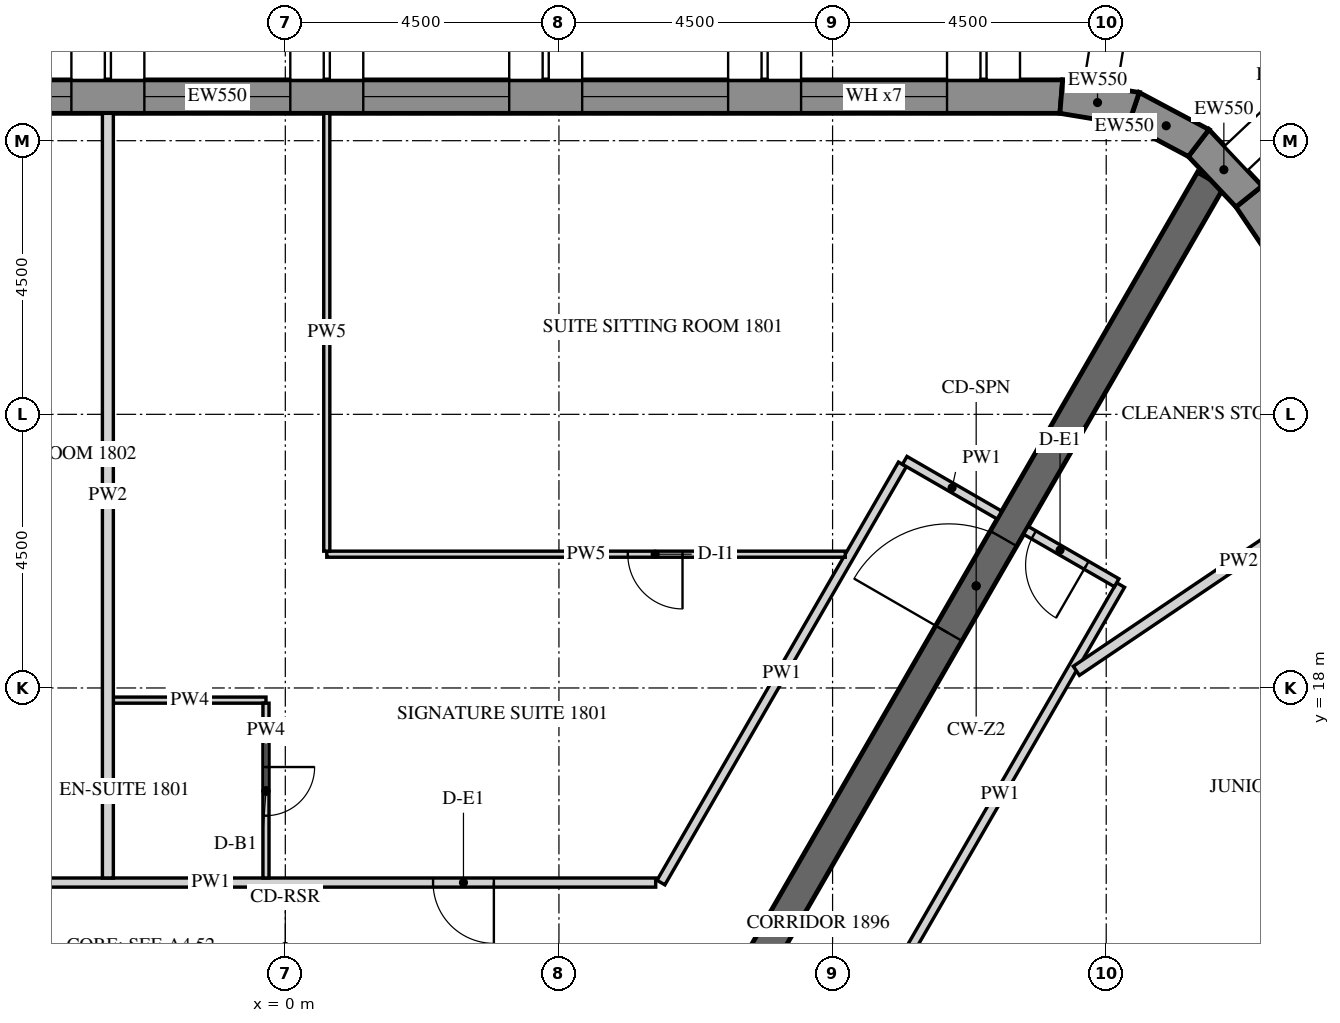
"""IFC4 building model, lengths in metres.
Left out: names, types, materials, properties, quantities, classifications, styles, units other than length and angle.
Written with IfcOpenShell. Run it as: python <this file> out.ifc"""

import sys

from ifc_helpers import new_model, si_unit, direction, frame, frame_2d, origin, place, context, subcontext, project, spatial, polyline, rectangle, outline, extrude, element, fill, save


model = new_model("IFC4")
c1 = context("Model", 3, precision=1e-05, world=origin(), true_north=direction((0.0, 1.0)))
c2 = subcontext(c1, "Body", "Model", "MODEL_VIEW")
j1 = project(units=[si_unit("LENGTHUNIT", "METRE"), si_unit("PLANEANGLEUNIT", "RADIAN")], contexts=[c1])
p1 = place(None, origin())
s1 = spatial("IfcSite", under=j1, at=p1, CompositionType="ELEMENT")
p2 = place(p1, origin())
s2 = spatial("IfcBuilding", under=s1, at=p2, CompositionType="ELEMENT")
p3 = place(p2, frame((0.0, 0.0, 226.8)))
s3 = spatial("IfcBuildingStorey", under=s2, at=p3, CompositionType="ELEMENT", Elevation=226.8)
p4 = place(p3, frame((12.761, 27.725, -0.15), z_axis=(0.0, 0.0, 1.0), x_axis=(-1.0, 0.0, 0.0)))
e1 = element("IfcWall", 1, at=p4, inside=s3, PredefinedType="SOLIDWALL", context=c2, shape_type="SweptSolid", body=[
    extrude(outline(polyline([(-0.022, -0.275), (27.783, -0.275), (27.732, 0.275), (0.022, 0.275), (-0.022, -0.275)])), origin(), (0.0, 0.0, 1.0), 3.9),
])
p5 = place(p4, frame((1.879, 0.0, 1.05)))
e2 = element("IfcOpeningElement", 2, at=p5, cuts=e1, PredefinedType="OPENING", context=c2, shape_type="SweptSolid", body=[
    extrude(rectangle(XDim=2.4, YDim=2.4, at=frame_2d((1.2, 1.2))), frame((0.0, 0.285, 0.0), z_axis=(0.0, -1.0, 0.0), x_axis=(1.0, 0.0, 0.0)), (0.0, 0.0, 1.0), 0.57),
])
p6 = place(p4, frame((5.479, 0.0, 1.05)))
e3 = element("IfcOpeningElement", 3, at=p6, cuts=e1, PredefinedType="OPENING", context=c2, shape_type="SweptSolid", body=[
    extrude(rectangle(XDim=2.4, YDim=2.4, at=frame_2d((1.2, 1.2))), frame((0.0, 0.285, 0.0), z_axis=(0.0, -1.0, 0.0), x_axis=(1.0, 0.0, 0.0)), (0.0, 0.0, 1.0), 0.57),
])
p7 = place(p4, frame((9.079, 0.0, 1.05)))
e4 = element("IfcOpeningElement", 4, at=p7, cuts=e1, PredefinedType="OPENING", context=c2, shape_type="SweptSolid", body=[
    extrude(rectangle(XDim=2.4, YDim=2.4, at=frame_2d((1.2, 1.2))), frame((0.0, 0.285, 0.0), z_axis=(0.0, -1.0, 0.0), x_axis=(1.0, 0.0, 0.0)), (0.0, 0.0, 1.0), 0.57),
])
p8 = place(p4, frame((12.679, 0.0, 1.05)))
e5 = element("IfcOpeningElement", 5, at=p8, cuts=e1, PredefinedType="OPENING", context=c2, shape_type="SweptSolid", body=[
    extrude(rectangle(XDim=2.4, YDim=2.4, at=frame_2d((1.2, 1.2))), frame((0.0, 0.285, 0.0), z_axis=(0.0, -1.0, 0.0), x_axis=(1.0, 0.0, 0.0)), (0.0, 0.0, 1.0), 0.57),
])
p9 = place(p4, frame((16.279, 0.0, 1.05)))
e6 = element("IfcOpeningElement", 6, at=p9, cuts=e1, PredefinedType="OPENING", context=c2, shape_type="SweptSolid", body=[
    extrude(rectangle(XDim=2.4, YDim=2.4, at=frame_2d((1.2, 1.2))), frame((0.0, 0.285, 0.0), z_axis=(0.0, -1.0, 0.0), x_axis=(1.0, 0.0, 0.0)), (0.0, 0.0, 1.0), 0.57),
])
p10 = place(p4, frame((19.879, 0.0, 1.05)))
e7 = element("IfcOpeningElement", 7, at=p10, cuts=e1, PredefinedType="OPENING", context=c2, shape_type="SweptSolid", body=[
    extrude(rectangle(XDim=2.4, YDim=2.4, at=frame_2d((1.2, 1.2))), frame((0.0, 0.285, 0.0), z_axis=(0.0, -1.0, 0.0), x_axis=(1.0, 0.0, 0.0)), (0.0, 0.0, 1.0), 0.57),
])
p11 = place(p4, frame((23.479, 0.0, 1.05)))
e8 = element("IfcOpeningElement", 8, at=p11, cuts=e1, PredefinedType="OPENING", context=c2, shape_type="SweptSolid", body=[
    extrude(rectangle(XDim=2.4, YDim=2.4, at=frame_2d((1.2, 1.2))), frame((0.0, 0.285, 0.0), z_axis=(0.0, -1.0, 0.0), x_axis=(1.0, 0.0, 0.0)), (0.0, 0.0, 1.0), 0.57),
])
p12 = place(p3, frame((31.371, 3.071, -0.15), z_axis=(0.0, 0.0, 1.0), x_axis=(-0.559189891278, 0.829039604297, 0.0)))
e9 = element("IfcWall", 9, at=p12, inside=s3, PredefinedType="SOLIDWALL", context=c2, shape_type="SweptSolid", body=[
    extrude(outline(polyline([(-0.026, -0.275), (27.781, -0.275), (27.736, 0.275), (0.026, 0.275), (-0.026, -0.275)])), origin(), (0.0, 0.0, 1.0), 3.9),
])
p13 = place(p12, frame((1.879, 0.0, 1.05)))
e10 = element("IfcOpeningElement", 10, at=p13, cuts=e9, PredefinedType="OPENING", context=c2, shape_type="SweptSolid", body=[
    extrude(rectangle(XDim=2.4, YDim=2.4, at=frame_2d((1.2, 1.2))), frame((0.0, 0.285, 0.0), z_axis=(0.0, -1.0, 0.0), x_axis=(1.0, 0.0, 0.0)), (0.0, 0.0, 1.0), 0.57),
])
p14 = place(p12, frame((5.479, 0.0, 1.05)))
e11 = element("IfcOpeningElement", 11, at=p14, cuts=e9, PredefinedType="OPENING", context=c2, shape_type="SweptSolid", body=[
    extrude(rectangle(XDim=2.4, YDim=2.4, at=frame_2d((1.2, 1.2))), frame((0.0, 0.285, 0.0), z_axis=(0.0, -1.0, 0.0), x_axis=(1.0, 0.0, 0.0)), (0.0, 0.0, 1.0), 0.57),
])
p15 = place(p12, frame((9.079, 0.0, 1.05)))
e12 = element("IfcOpeningElement", 12, at=p15, cuts=e9, PredefinedType="OPENING", context=c2, shape_type="SweptSolid", body=[
    extrude(rectangle(XDim=2.4, YDim=2.4, at=frame_2d((1.2, 1.2))), frame((0.0, 0.285, 0.0), z_axis=(0.0, -1.0, 0.0), x_axis=(1.0, 0.0, 0.0)), (0.0, 0.0, 1.0), 0.57),
])
p16 = place(p12, frame((12.679, 0.0, 1.05)))
e13 = element("IfcOpeningElement", 13, at=p16, cuts=e9, PredefinedType="OPENING", context=c2, shape_type="SweptSolid", body=[
    extrude(rectangle(XDim=2.4, YDim=2.4, at=frame_2d((1.2, 1.2))), frame((0.0, 0.285, 0.0), z_axis=(0.0, -1.0, 0.0), x_axis=(1.0, 0.0, 0.0)), (0.0, 0.0, 1.0), 0.57),
])
p17 = place(p12, frame((16.279, 0.0, 1.05)))
e14 = element("IfcOpeningElement", 14, at=p17, cuts=e9, PredefinedType="OPENING", context=c2, shape_type="SweptSolid", body=[
    extrude(rectangle(XDim=2.4, YDim=2.4, at=frame_2d((1.2, 1.2))), frame((0.0, 0.285, 0.0), z_axis=(0.0, -1.0, 0.0), x_axis=(1.0, 0.0, 0.0)), (0.0, 0.0, 1.0), 0.57),
])
p18 = place(p12, frame((19.879, 0.0, 1.05)))
e15 = element("IfcOpeningElement", 15, at=p18, cuts=e9, PredefinedType="OPENING", context=c2, shape_type="SweptSolid", body=[
    extrude(rectangle(XDim=2.4, YDim=2.4, at=frame_2d((1.2, 1.2))), frame((0.0, 0.285, 0.0), z_axis=(0.0, -1.0, 0.0), x_axis=(1.0, 0.0, 0.0)), (0.0, 0.0, 1.0), 0.57),
])
p19 = place(p12, frame((23.479, 0.0, 1.05)))
e16 = element("IfcOpeningElement", 16, at=p19, cuts=e9, PredefinedType="OPENING", context=c2, shape_type="SweptSolid", body=[
    extrude(rectangle(XDim=2.4, YDim=2.4, at=frame_2d((1.2, 1.2))), frame((0.0, 0.285, 0.0), z_axis=(0.0, -1.0, 0.0), x_axis=(1.0, 0.0, 0.0)), (0.0, 0.0, 1.0), 0.57),
])
p20 = place(p3, frame((15.849, 26.083, -0.15), z_axis=(0.0, 0.0, 1.0), x_axis=(-0.686196220404, 0.727416488061, 0.0)))
e17 = element("IfcWall", 17, at=p20, inside=s3, PredefinedType="SOLIDWALL", context=c2, shape_type="SweptSolid", body=[
    extrude(outline(polyline([(-0.022, -0.275), (1.253, -0.275), (1.163, 0.275), (0.022, 0.275), (-0.022, -0.275)])), origin(), (0.0, 0.0, 1.0), 3.9),
])
p21 = place(p3, frame((15.02, 26.962, -0.15), z_axis=(0.0, 0.0, 1.0), x_axis=(-0.882950818639, 0.469465495926, 0.0)))
e18 = element("IfcWall", 18, at=p21, inside=s3, PredefinedType="SOLIDWALL", context=c2, shape_type="SweptSolid", body=[
    extrude(outline(polyline([(-0.045, -0.275), (1.253, -0.275), (1.163, 0.275), (0.045, 0.275), (-0.045, -0.275)])), origin(), (0.0, 0.0, 1.0), 3.9),
])
p22 = place(p3, frame((13.953, 27.529, -0.15), z_axis=(0.0, 0.0, 1.0), x_axis=(-0.986751945211, 0.162236243244, 0.0)))
e19 = element("IfcWall", 19, at=p22, inside=s3, PredefinedType="SOLIDWALL", context=c2, shape_type="SweptSolid", body=[
    extrude(outline(polyline([(-0.045, -0.275), (1.231, -0.275), (1.186, 0.275), (0.045, 0.275), (-0.045, -0.275)])), origin(), (0.0, 0.0, 1.0), 3.9),
])
p23 = place(p3, frame((7.506, 13.0, -0.15), z_axis=(0.0, 0.0, 1.0), x_axis=(0.499988271576, 0.866032175087, 0.0)))
e20 = element("IfcWall", 20, at=p23, inside=s3, PredefinedType="SHEAR", context=c2, shape_type="SweptSolid", body=[
    extrude(rectangle(XDim=15.424, YDim=0.5, at=frame_2d((7.712, 0.0))), origin(), (0.0, 0.0, 1.0), 3.9),
])
p24 = place(p23, frame((6.812, 0.0, 0.15)))
e21 = element("IfcOpeningElement", 21, at=p24, cuts=e20, PredefinedType="OPENING", context=c2, shape_type="SweptSolid", body=[
    extrude(rectangle(XDim=1.8, YDim=2.4, at=frame_2d((0.9, 1.2))), frame((0.0, 0.26, 0.0), z_axis=(0.0, -1.0, 0.0), x_axis=(1.0, 0.0, 0.0)), (0.0, 0.0, 1.0), 0.52),
])
p25 = place(p3, frame((10.149, 21.678, 0.0), z_axis=(0.0, 0.0, 1.0), x_axis=(-0.499997422768, -0.866026891745, 0.0)))
e22 = element("IfcWall", 22, at=p25, inside=s3, PredefinedType="PARTITIONING", context=c2, shape_type="SweptSolid", body=[
    extrude(rectangle(XDim=7.942, YDim=0.15, at=frame_2d((3.971, 0.0))), origin(), (0.0, 0.0, 1.0), 2.988),
])
p26 = place(p3, frame((6.091, 14.8, 0.0), z_axis=(0.0, 0.0, 1.0), x_axis=(-1.0, 0.0, 0.0)))
e23 = element("IfcWall", 23, at=p26, inside=s3, PredefinedType="PARTITIONING", context=c2, shape_type="SweptSolid", body=[
    extrude(rectangle(XDim=14.636, YDim=0.15, at=frame_2d((7.318, 0.0))), origin(), (0.0, 0.0, 1.0), 2.988),
])
p27 = place(p26, frame((2.661, 0.0, 0.0)))
e24 = element("IfcOpeningElement", 24, at=p27, cuts=e23, PredefinedType="OPENING", context=c2, shape_type="SweptSolid", body=[
    extrude(rectangle(XDim=1.0, YDim=2.1, at=frame_2d((0.5, 1.05))), frame((0.0, 0.085, 0.0), z_axis=(0.0, -1.0, 0.0), x_axis=(1.0, 0.0, 0.0)), (0.0, 0.0, 1.0), 0.17),
])
p28 = place(p26, frame((10.309, 0.0, 0.0)))
e25 = element("IfcOpeningElement", 25, at=p28, cuts=e23, PredefinedType="OPENING", context=c2, shape_type="SweptSolid", body=[
    extrude(rectangle(XDim=1.0, YDim=2.1, at=frame_2d((0.5, 1.05))), frame((0.0, 0.085, 0.0), z_axis=(0.0, -1.0, 0.0), x_axis=(1.0, 0.0, 0.0)), (0.0, 0.0, 1.0), 0.17),
])
p29 = place(p26, frame((13.486, 0.0, 0.0)))
e26 = element("IfcOpeningElement", 26, at=p29, cuts=e23, PredefinedType="OPENING", context=c2, shape_type="SweptSolid", body=[
    extrude(rectangle(XDim=1.0, YDim=2.1, at=frame_2d((0.5, 1.05))), frame((0.0, 0.085, 0.0), z_axis=(0.0, -1.0, 0.0), x_axis=(1.0, 0.0, 0.0)), (0.0, 0.0, 1.0), 0.17),
])
p30 = place(p3, frame((11.745, 20.843, 0.0), z_axis=(0.0, 0.0, 1.0), x_axis=(-0.865989075817, 0.500062916607, 0.0)))
e27 = element("IfcWall", 27, at=p30, inside=s3, PredefinedType="PARTITIONING", context=c2, shape_type="SweptSolid", body=[
    extrude(rectangle(XDim=1.8, YDim=0.15, at=frame_2d((0.9, 0.0))), origin(), (0.0, 0.0, 1.0), 2.988),
])
p31 = place(p3, frame((9.772, 12.825, 0.0), z_axis=(0.0, 0.0, 1.0), x_axis=(0.499989830942, 0.866031274813, 0.0)))
e28 = element("IfcWall", 28, at=p31, inside=s3, PredefinedType="PARTITIONING", context=c2, shape_type="SweptSolid", body=[
    extrude(rectangle(XDim=7.93, YDim=0.15, at=frame_2d((3.965, 0.0))), origin(), (0.0, 0.0, 1.0), 2.988),
])
p32 = place(p3, frame((13.672, 19.73, 0.0), z_axis=(0.0, 0.0, 1.0), x_axis=(-0.866074815912, 0.499914405916, 0.0)))
e29 = element("IfcWall", 29, at=p32, inside=s3, PredefinedType="PARTITIONING", context=c2, shape_type="SweptSolid", body=[
    extrude(rectangle(XDim=1.725, YDim=0.15, at=frame_2d((0.862, 0.0))), origin(), (0.0, 0.0, 1.0), 2.988),
])
p33 = place(p32, frame((0.575, 0.0, 0.0)))
e30 = element("IfcOpeningElement", 30, at=p33, cuts=e29, PredefinedType="OPENING", context=c2, shape_type="SweptSolid", body=[
    extrude(rectangle(XDim=1.0, YDim=2.1, at=frame_2d((0.5, 1.05))), frame((0.0, 0.085, 0.0), z_axis=(0.0, -1.0, 0.0), x_axis=(1.0, 0.0, 0.0)), (0.0, 0.0, 1.0), 0.17),
])
p34 = place(p3, frame((-2.828, 17.8, 0.0), z_axis=(0.0, 0.0, 1.0), x_axis=(1.0, 0.0, 0.0)))
e31 = element("IfcWall", 31, at=p34, inside=s3, PredefinedType="PARTITIONING", context=c2, shape_type="SweptSolid", body=[
    extrude(rectangle(XDim=2.51, YDim=0.1, at=frame_2d((1.255, 0.0))), origin(), (0.0, 0.0, 1.0), 2.988),
])
p35 = place(p3, frame((-0.318, 17.75, 0.0), z_axis=(0.0, 0.0, 1.0), x_axis=(0.0, -1.0, 0.0)))
e32 = element("IfcWall", 32, at=p35, inside=s3, PredefinedType="PARTITIONING", context=c2, shape_type="SweptSolid", body=[
    extrude(rectangle(XDim=2.875, YDim=0.1, at=frame_2d((1.438, 0.0))), origin(), (0.0, 0.0, 1.0), 2.988),
])
p36 = place(p35, frame((1.05, 0.0, 0.0)))
e33 = element("IfcOpeningElement", 33, at=p36, cuts=e32, PredefinedType="OPENING", context=c2, shape_type="SweptSolid", body=[
    extrude(rectangle(XDim=0.8, YDim=2.1, at=frame_2d((0.4, 1.05))), frame((0.0, 0.06, 0.0), z_axis=(0.0, -1.0, 0.0), x_axis=(1.0, 0.0, 0.0)), (0.0, 0.0, 1.0), 0.12),
])
p37 = place(p3, frame((9.209, 20.2, 0.0), z_axis=(0.0, 0.0, 1.0), x_axis=(-1.0, 0.0, 0.0)))
e34 = element("IfcWall", 34, at=p37, inside=s3, PredefinedType="PARTITIONING", context=c2, shape_type="SweptSolid", body=[
    extrude(rectangle(XDim=8.527, YDim=0.1, at=frame_2d((4.263, 0.0))), origin(), (0.0, 0.0, 1.0), 2.988),
])
p38 = place(p37, frame((2.677, 0.0, 0.0)))
e35 = element("IfcOpeningElement", 35, at=p38, cuts=e34, PredefinedType="OPENING", context=c2, shape_type="SweptSolid", body=[
    extrude(rectangle(XDim=0.9, YDim=2.1, at=frame_2d((0.45, 1.05))), frame((0.0, 0.06, 0.0), z_axis=(0.0, -1.0, 0.0), x_axis=(1.0, 0.0, 0.0)), (0.0, 0.0, 1.0), 0.12),
])
p39 = place(p3, frame((0.682, 20.25, 0.0), z_axis=(0.0, 0.0, 1.0), x_axis=(0.0, 1.0, 0.0)))
e36 = element("IfcWall", 36, at=p39, inside=s3, PredefinedType="PARTITIONING", context=c2, shape_type="SweptSolid", body=[
    extrude(rectangle(XDim=7.2, YDim=0.1, at=frame_2d((3.6, 0.0))), origin(), (0.0, 0.0, 1.0), 2.988),
])
p40 = place(p3, frame((-2.918, 27.45, 0.0), z_axis=(0.0, 0.0, 1.0), x_axis=(0.0, -1.0, 0.0)))
e37 = element("IfcWall", 37, at=p40, inside=s3, PredefinedType="PARTITIONING", context=c2, shape_type="SweptSolid", body=[
    extrude(rectangle(XDim=12.575, YDim=0.18, at=frame_2d((6.288, 0.0))), origin(), (0.0, 0.0, 1.0), 2.988),
])
p41 = place(p3, frame((22.376, 15.915, 0.0), z_axis=(0.0, 0.0, 1.0), x_axis=(-0.829037148953, -0.559193531487, 0.0)))
e38 = element("IfcWall", 38, at=p41, inside=s3, PredefinedType="PARTITIONING", context=c2, shape_type="SweptSolid", body=[
    extrude(rectangle(XDim=12.491, YDim=0.18, at=frame_2d((6.246, 0.0))), origin(), (0.0, 0.0, 1.0), 2.988),
])
p42 = place(p3, frame((18.35, 21.884, 0.0), z_axis=(0.0, 0.0, 1.0), x_axis=(-0.829047205772, -0.559178621374, 0.0)))
e39 = element("IfcWall", 39, at=p42, inside=s3, PredefinedType="PARTITIONING", context=c2, shape_type="SweptSolid", body=[
    extrude(rectangle(XDim=6.442, YDim=0.18, at=frame_2d((3.221, 0.0))), origin(), (0.0, 0.0, 1.0), 2.988),
])
p43 = place(p5, frame((0.0, 0.205, 0.0)))
e40 = element("IfcWindow", 40, at=p43, inside=s3, PartitioningType="DOUBLE_PANEL_VERTICAL", PredefinedType="WINDOW", context=c2, shape_type="SweptSolid", body=[
    extrude(rectangle(XDim=2.4, YDim=2.4, at=frame_2d((1.2, 1.2))), frame((0.0, 0.03, 0.0), z_axis=(0.0, -1.0, 0.0), x_axis=(1.0, 0.0, 0.0)), (0.0, 0.0, 1.0), 0.06),
])
fill(e2, e40)
p44 = place(p6, frame((0.0, 0.205, 0.0)))
e41 = element("IfcWindow", 41, at=p44, inside=s3, PartitioningType="DOUBLE_PANEL_VERTICAL", PredefinedType="WINDOW", context=c2, shape_type="SweptSolid", body=[
    extrude(rectangle(XDim=2.4, YDim=2.4, at=frame_2d((1.2, 1.2))), frame((0.0, 0.03, 0.0), z_axis=(0.0, -1.0, 0.0), x_axis=(1.0, 0.0, 0.0)), (0.0, 0.0, 1.0), 0.06),
])
fill(e3, e41)
p45 = place(p7, frame((0.0, 0.205, 0.0)))
e42 = element("IfcWindow", 42, at=p45, inside=s3, PartitioningType="DOUBLE_PANEL_VERTICAL", PredefinedType="WINDOW", context=c2, shape_type="SweptSolid", body=[
    extrude(rectangle(XDim=2.4, YDim=2.4, at=frame_2d((1.2, 1.2))), frame((0.0, 0.03, 0.0), z_axis=(0.0, -1.0, 0.0), x_axis=(1.0, 0.0, 0.0)), (0.0, 0.0, 1.0), 0.06),
])
fill(e4, e42)
p46 = place(p8, frame((0.0, 0.205, 0.0)))
e43 = element("IfcWindow", 43, at=p46, inside=s3, PartitioningType="DOUBLE_PANEL_VERTICAL", PredefinedType="WINDOW", context=c2, shape_type="SweptSolid", body=[
    extrude(rectangle(XDim=2.4, YDim=2.4, at=frame_2d((1.2, 1.2))), frame((0.0, 0.03, 0.0), z_axis=(0.0, -1.0, 0.0), x_axis=(1.0, 0.0, 0.0)), (0.0, 0.0, 1.0), 0.06),
])
fill(e5, e43)
p47 = place(p9, frame((0.0, 0.205, 0.0)))
e44 = element("IfcWindow", 44, at=p47, inside=s3, PartitioningType="DOUBLE_PANEL_VERTICAL", PredefinedType="WINDOW", context=c2, shape_type="SweptSolid", body=[
    extrude(rectangle(XDim=2.4, YDim=2.4, at=frame_2d((1.2, 1.2))), frame((0.0, 0.03, 0.0), z_axis=(0.0, -1.0, 0.0), x_axis=(1.0, 0.0, 0.0)), (0.0, 0.0, 1.0), 0.06),
])
fill(e6, e44)
p48 = place(p24, origin())
e45 = element("IfcDoor", 45, at=p48, inside=s3, OperationType="DOUBLE_DOOR_SINGLE_SWING", PredefinedType="DOOR", context=c2, shape_type="SweptSolid", body=[
    extrude(rectangle(XDim=1.8, YDim=2.4, at=frame_2d((0.9, 1.2))), frame((0.0, 0.025, 0.0), z_axis=(0.0, -1.0, 0.0), x_axis=(1.0, 0.0, 0.0)), (0.0, 0.0, 1.0), 0.05),
])
fill(e21, e45)
p49 = place(p27, origin())
e46 = element("IfcDoor", 46, at=p49, inside=s3, OperationType="SINGLE_SWING_RIGHT", PredefinedType="DOOR", context=c2, shape_type="SweptSolid", body=[
    extrude(rectangle(XDim=1.0, YDim=2.1, at=frame_2d((0.5, 1.05))), frame((0.0, 0.025, 0.0), z_axis=(0.0, -1.0, 0.0), x_axis=(1.0, 0.0, 0.0)), (0.0, 0.0, 1.0), 0.05),
])
fill(e24, e46)
p50 = place(p36, origin())
e47 = element("IfcDoor", 47, at=p50, inside=s3, OperationType="SINGLE_SWING_LEFT", PredefinedType="DOOR", context=c2, shape_type="SweptSolid", body=[
    extrude(rectangle(XDim=0.8, YDim=2.1, at=frame_2d((0.4, 1.05))), frame((0.0, 0.025, 0.0), z_axis=(0.0, -1.0, 0.0), x_axis=(1.0, 0.0, 0.0)), (0.0, 0.0, 1.0), 0.05),
])
fill(e33, e47)
p51 = place(p38, origin())
e48 = element("IfcDoor", 48, at=p51, inside=s3, OperationType="SINGLE_SWING_RIGHT", PredefinedType="DOOR", context=c2, shape_type="SweptSolid", body=[
    extrude(rectangle(XDim=0.9, YDim=2.1, at=frame_2d((0.45, 1.05))), frame((0.0, 0.025, 0.0), z_axis=(0.0, -1.0, 0.0), x_axis=(1.0, 0.0, 0.0)), (0.0, 0.0, 1.0), 0.05),
])
fill(e35, e48)
p52 = place(p33, origin())
e49 = element("IfcDoor", 49, at=p52, inside=s3, OperationType="SINGLE_SWING_LEFT", PredefinedType="DOOR", context=c2, shape_type="SweptSolid", body=[
    extrude(rectangle(XDim=1.0, YDim=2.1, at=frame_2d((0.5, 1.05))), frame((0.0, 0.025, 0.0), z_axis=(0.0, -1.0, 0.0), x_axis=(1.0, 0.0, 0.0)), (0.0, 0.0, 1.0), 0.05),
])
fill(e30, e49)
save(model, sys.argv[1])
